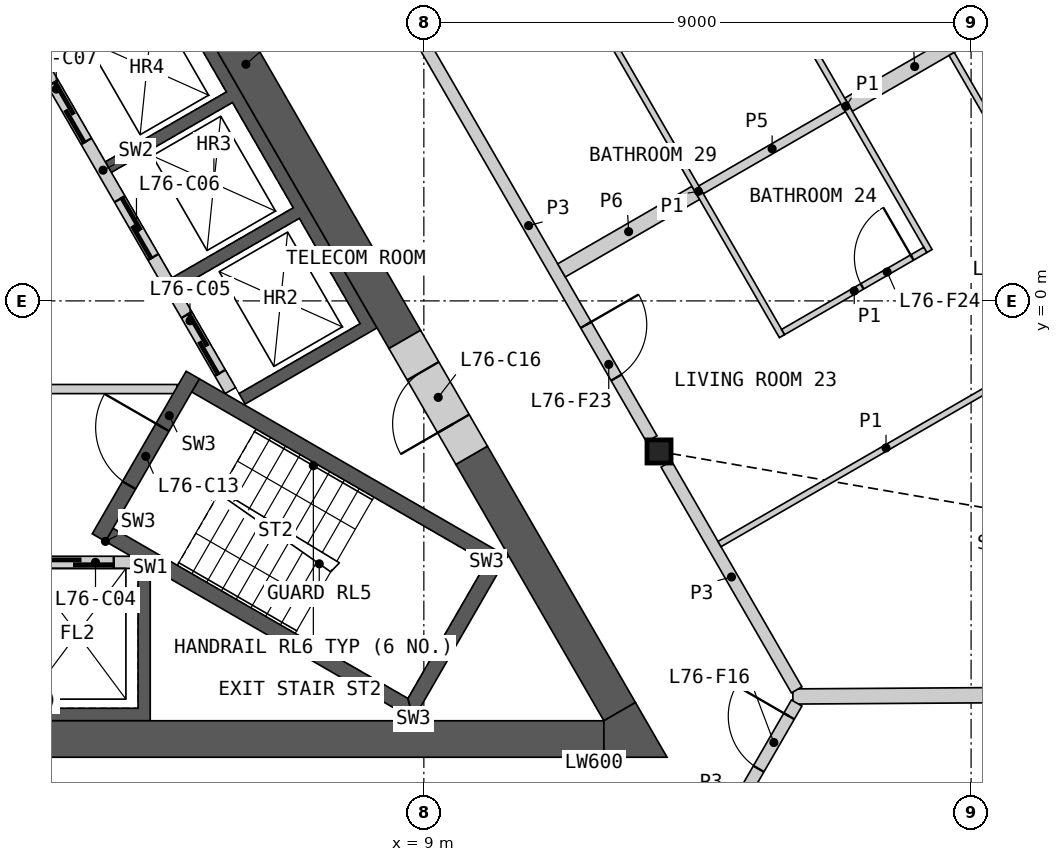
"""IFC4 building model, lengths in metres.
Left out: names, types, materials, properties, quantities, classifications, styles, units other than length and angle.
Written with IfcOpenShell. Run it as: python <this file> out.ifc"""

import sys

from ifc_helpers import new_model, si_unit, direction, frame, frame_2d, origin, origin_2d, place, context, subcontext, project, spatial, polyline, rectangle, i_section, outline, extrude, element, fill, save


model = new_model("IFC4")
c1 = context("Model", 3, precision=1e-05, world=origin(), true_north=direction((0.0, 1.0)))
c2 = subcontext(c1, "Body", "Model", "MODEL_VIEW")
j1 = project(units=[si_unit("LENGTHUNIT", "METRE"), si_unit("PLANEANGLEUNIT", "RADIAN")], contexts=[c1])
p1 = place(None, origin())
s1 = spatial("IfcSite", under=j1, at=p1, CompositionType="ELEMENT")
p2 = place(p1, origin())
s2 = spatial("IfcBuilding", under=s1, at=p2, CompositionType="ELEMENT")
p3 = place(p2, frame((0.0, 0.0, 339.2)))
s3 = spatial("IfcBuildingStorey", under=s2, at=p3, CompositionType="ELEMENT", Elevation=339.2)
p4 = place(p3, frame((12.868, -2.476, 0.0), z_axis=(0.0, 0.0, 1.0), x_axis=(1.0, 0.0, 0.0)))
e1 = element("IfcColumn", 1, at=p4, inside=s3, PredefinedType="COLUMN", context=c2, shape_type="SweptSolid", body=[
    extrude(i_section(OverallWidth=0.396, OverallDepth=0.381, WebThickness=0.019, FlangeThickness=0.03, at=origin_2d()), origin(), (0.0, 0.0, 1.0), 3.4),
])
p5 = place(p3, origin())
e2 = element("IfcWall", 2, at=p5, inside=s3, PredefinedType="SHEAR", context=c2, shape_type="SweptSolid", body=[
    extrude(outline(polyline([(4.5, -4.4), (4.5, -6.906), (-4.5, -6.906), (-4.5, -4.4), (-4.3, -4.4), (-4.3, -6.7), (-2.3, -6.7), (-2.3, -4.4), (-2.1, -4.4), (-2.1, -6.7), (-0.1, -6.7), (-0.1, -4.4), (0.1, -4.4), (0.1, -6.7), (2.1, -6.7), (2.1, -4.4), (2.3, -4.4), (2.3, -6.7), (4.3, -6.7), (4.3, -4.4), (4.5, -4.4)])), origin(), (0.0, 0.0, 1.0), 3.1),
])
p6 = place(p3, frame((-4.187, -4.3, 0.0), z_axis=(0.0, 0.0, 1.0), x_axis=(1.0, 0.0, 0.0)))
e3 = element("IfcWall", 3, at=p6, inside=s3, PredefinedType="SOLIDWALL", context=c2, shape_type="SweptSolid", body=[
    extrude(rectangle(XDim=8.373, YDim=0.2, at=frame_2d((4.187, 0.0))), origin(), (0.0, 0.0, 1.0), 3.1),
])
p7 = place(p6, frame((0.287, 0.0, 0.0)))
e4 = element("IfcOpeningElement", 4, at=p7, cuts=e3, PredefinedType="OPENING", context=c2, shape_type="SweptSolid", body=[
    extrude(rectangle(XDim=1.2, YDim=2.1, at=frame_2d((0.6, 1.05))), frame((0.0, 0.11, 0.0), z_axis=(0.0, -1.0, 0.0), x_axis=(1.0, 0.0, 0.0)), (0.0, 0.0, 1.0), 0.22),
])
p8 = place(p6, frame((2.387, 0.0, 0.0)))
e5 = element("IfcOpeningElement", 5, at=p8, cuts=e3, PredefinedType="OPENING", context=c2, shape_type="SweptSolid", body=[
    extrude(rectangle(XDim=1.4, YDim=2.1, at=frame_2d((0.7, 1.05))), frame((0.0, 0.11, 0.0), z_axis=(0.0, -1.0, 0.0), x_axis=(1.0, 0.0, 0.0)), (0.0, 0.0, 1.0), 0.22),
])
p9 = place(p6, frame((4.737, 0.0, 0.0)))
e6 = element("IfcOpeningElement", 6, at=p9, cuts=e3, PredefinedType="OPENING", context=c2, shape_type="SweptSolid", body=[
    extrude(rectangle(XDim=1.1, YDim=2.1, at=frame_2d((0.55, 1.05))), frame((0.0, 0.11, 0.0), z_axis=(0.0, -1.0, 0.0), x_axis=(1.0, 0.0, 0.0)), (0.0, 0.0, 1.0), 0.22),
])
p10 = place(p6, frame((6.887, 0.0, 0.0)))
e7 = element("IfcOpeningElement", 7, at=p10, cuts=e3, PredefinedType="OPENING", context=c2, shape_type="SweptSolid", body=[
    extrude(rectangle(XDim=1.2, YDim=2.1, at=frame_2d((0.6, 1.05))), frame((0.0, 0.11, 0.0), z_axis=(0.0, -1.0, 0.0), x_axis=(1.0, 0.0, 0.0)), (0.0, 0.0, 1.0), 0.22),
])
p11 = place(p3, origin())
e8 = element("IfcWall", 8, at=p11, inside=s3, PredefinedType="SHEAR", context=c2, shape_type="SweptSolid", body=[
    extrude(outline(polyline([(1.561, 6.097), (3.731, 7.35), (8.231, -0.444), (6.061, -1.697), (5.96, -1.524), (7.952, -0.374), (6.952, 1.358), (4.96, 0.208), (4.861, 0.381), (6.852, 1.531), (5.852, 3.263), (3.861, 2.113), (3.76, 2.287), (5.752, 3.437), (4.752, 5.169), (2.76, 4.019), (2.66, 4.192), (4.652, 5.342), (3.652, 7.074), (1.66, 5.924), (1.561, 6.097)])), origin(), (0.0, 0.0, 1.0), 3.1),
])
p12 = place(p3, frame((5.817, -1.476, 0.0), z_axis=(0.0, 0.0, 1.0), x_axis=(-0.500002616675, 0.866023893041, 0.0)))
e9 = element("IfcWall", 9, at=p12, inside=s3, PredefinedType="SOLIDWALL", context=c2, shape_type="SweptSolid", body=[
    extrude(rectangle(XDim=8.373, YDim=0.2, at=frame_2d((4.187, 0.0))), origin(), (0.0, 0.0, 1.0), 3.1),
])
p13 = place(p12, frame((0.337, 0.0, 0.0)))
e10 = element("IfcOpeningElement", 10, at=p13, cuts=e9, PredefinedType="OPENING", context=c2, shape_type="SweptSolid", body=[
    extrude(rectangle(XDim=1.1, YDim=2.1, at=frame_2d((0.55, 1.05))), frame((0.0, 0.11, 0.0), z_axis=(0.0, -1.0, 0.0), x_axis=(1.0, 0.0, 0.0)), (0.0, 0.0, 1.0), 0.22),
])
p14 = place(p12, frame((2.537, 0.0, 0.0)))
e11 = element("IfcOpeningElement", 11, at=p14, cuts=e9, PredefinedType="OPENING", context=c2, shape_type="SweptSolid", body=[
    extrude(rectangle(XDim=1.1, YDim=2.1, at=frame_2d((0.55, 1.05))), frame((0.0, 0.11, 0.0), z_axis=(0.0, -1.0, 0.0), x_axis=(1.0, 0.0, 0.0)), (0.0, 0.0, 1.0), 0.22),
])
p15 = place(p12, frame((4.737, 0.0, 0.0)))
e12 = element("IfcOpeningElement", 12, at=p15, cuts=e9, PredefinedType="OPENING", context=c2, shape_type="SweptSolid", body=[
    extrude(rectangle(XDim=1.1, YDim=2.1, at=frame_2d((0.55, 1.05))), frame((0.0, 0.11, 0.0), z_axis=(0.0, -1.0, 0.0), x_axis=(1.0, 0.0, 0.0)), (0.0, 0.0, 1.0), 0.22),
])
p16 = place(p12, frame((7.037, 0.0, 0.0)))
e13 = element("IfcOpeningElement", 13, at=p16, cuts=e9, PredefinedType="OPENING", context=c2, shape_type="SweptSolid", body=[
    extrude(rectangle(XDim=0.9, YDim=2.1, at=frame_2d((0.45, 1.05))), frame((0.0, 0.11, 0.0), z_axis=(0.0, -1.0, 0.0), x_axis=(1.0, 0.0, 0.0)), (0.0, 0.0, 1.0), 0.22),
])
p17 = place(p3, frame((-4.941, -1.45, 0.0), z_axis=(0.0, 0.0, 1.0), x_axis=(1.0, 0.0, 0.0)))
e14 = element("IfcWall", 14, at=p17, inside=s3, PredefinedType="PARTITIONING", context=c2, shape_type="SweptSolid", body=[
    extrude(rectangle(XDim=9.882, YDim=0.15, at=frame_2d((4.941, 0.0))), origin(), (0.0, 0.0, 1.0), 3.1),
])
p18 = place(p17, frame((4.391, 0.0, 0.0)))
e15 = element("IfcOpeningElement", 15, at=p18, cuts=e14, PredefinedType="OPENING", context=c2, shape_type="SweptSolid", body=[
    extrude(rectangle(XDim=1.1, YDim=2.1, at=frame_2d((0.55, 1.05))), frame((0.0, 0.085, 0.0), z_axis=(0.0, -1.0, 0.0), x_axis=(1.0, 0.0, 0.0)), (0.0, 0.0, 1.0), 0.17),
])
p19 = place(p3, origin())
e16 = element("IfcWall", 16, at=p19, inside=s3, PredefinedType="SHEAR", context=c2, shape_type="SweptSolid", body=[
    extrude(outline(polyline([(3.763, -3.956), (8.83, -6.881), (8.738, -6.539), (3.888, -3.739), (3.763, -3.956)])), origin(), (0.0, 0.0, 1.0), 3.1),
])
p20 = place(p3, origin())
e17 = element("IfcWall", 17, at=p20, inside=s3, PredefinedType="SHEAR", context=c2, shape_type="SweptSolid", body=[
    extrude(outline(polyline([(8.83, -6.881), (10.374, -4.206), (10.032, -4.298), (8.738, -6.539), (8.83, -6.881)])), origin(), (0.0, 0.0, 1.0), 3.1),
])
p21 = place(p3, origin())
e18 = element("IfcWall", 18, at=p21, inside=s3, PredefinedType="SHEAR", context=c2, shape_type="SweptSolid", body=[
    extrude(outline(polyline([(10.032, -4.298), (10.374, -4.206), (5.307, -1.281), (5.182, -1.498), (10.032, -4.298)])), origin(), (0.0, 0.0, 1.0), 3.1),
])
p22 = place(p3, frame((3.655, -3.893, 0.0), z_axis=(0.0, 0.0, 1.0), x_axis=(0.499982516597, 0.866035497597, 0.0)))
e19 = element("IfcWall", 19, at=p22, inside=s3, PredefinedType="SHEAR", context=c2, shape_type="SweptSolid", body=[
    extrude(rectangle(XDim=3.088, YDim=0.25, at=frame_2d((1.544, 0.0))), origin(), (0.0, 0.0, 1.0), 3.1),
])
p23 = place(p22, frame((0.994, 0.0, 0.0)))
e20 = element("IfcOpeningElement", 20, at=p23, cuts=e19, PredefinedType="OPENING", context=c2, shape_type="SweptSolid", body=[
    extrude(rectangle(XDim=1.1, YDim=2.1, at=frame_2d((0.55, 1.05))), frame((0.0, 0.135, 0.0), z_axis=(0.0, -1.0, 0.0), x_axis=(1.0, 0.0, 0.0)), (0.0, 0.0, 1.0), 0.27),
])
p24 = place(p3, frame((-11.961, -7.206, 0.0), z_axis=(0.0, 0.0, 1.0), x_axis=(1.0, 0.0, 0.0)))
e21 = element("IfcWall", 21, at=p24, inside=s3, PredefinedType="SHEAR", context=c2, shape_type="SweptSolid", body=[
    extrude(rectangle(XDim=23.921, YDim=0.6, at=frame_2d((11.961, 0.0))), origin(), (0.0, 0.0, 1.0), 3.1),
])
p25 = place(p3, frame((8.686, -0.634, 0.0), z_axis=(0.0, 0.0, 1.0), x_axis=(-0.50001836461, 0.866014800712, 0.0)))
e22 = element("IfcWall", 22, at=p25, inside=s3, PredefinedType="SHEAR", context=c2, shape_type="SweptSolid", body=[
    extrude(rectangle(XDim=10.451, YDim=0.6, at=frame_2d((5.225, 0.0))), origin(), (0.0, 0.0, 1.0), 3.1),
])
p26 = place(p3, frame((12.221, -6.756, 0.0), z_axis=(0.0, 0.0, 1.0), x_axis=(-0.50000604952, 0.866021911064, 0.0)))
e23 = element("IfcWall", 23, at=p26, inside=s3, PredefinedType="SHEAR", context=c2, shape_type="SweptSolid", body=[
    extrude(rectangle(XDim=4.869, YDim=0.6, at=frame_2d((2.434, 0.0))), origin(), (0.0, 0.0, 1.0), 3.1),
])
p27 = place(p3, origin())
e24 = element("IfcWall", 24, at=p27, inside=s3, PredefinedType="SHEAR", context=c2, shape_type="SweptSolid", body=[
    extrude(outline(polyline([(11.961, -7.506), (11.961, -6.906), (12.48, -6.606), (13.0, -7.506), (11.961, -7.506)])), origin(), (0.0, 0.0, 1.0), 3.1),
])
p28 = place(p3, frame((9.786, -2.539, 0.0), z_axis=(0.0, 0.0, 1.0), x_axis=(-0.499981787252, 0.866035918664, 0.0)))
e25 = element("IfcWall", 25, at=p28, inside=s3, PredefinedType="SHEAR", context=c2, shape_type="SweptSolid", body=[
    extrude(rectangle(XDim=2.2, YDim=0.6, at=frame_2d((1.1, 0.0))), origin(), (0.0, 0.0, 1.0), 3.1),
])
p29 = place(p28, frame((0.6, 0.0, 0.0)))
e26 = element("IfcOpeningElement", 26, at=p29, cuts=e25, PredefinedType="OPENING", context=c2, shape_type="SweptSolid", body=[
    extrude(rectangle(XDim=1.0, YDim=2.1, at=frame_2d((0.5, 1.05))), frame((0.0, 0.31, 0.0), z_axis=(0.0, -1.0, 0.0), x_axis=(1.0, 0.0, 0.0)), (0.0, 0.0, 1.0), 0.62),
])
p30 = place(p3, frame((8.698, 4.745, 0.0), z_axis=(0.0, 0.0, 1.0), x_axis=(0.499984266882, -0.866034487114, 0.0)))
e27 = element("IfcWall", 27, at=p30, inside=s3, PredefinedType="PARTITIONING", context=c2, shape_type="SweptSolid", body=[
    extrude(rectangle(XDim=8.099, YDim=0.2, at=frame_2d((4.049, 0.0))), origin(), (0.0, 0.0, 1.0), 3.1),
])
p31 = place(p30, frame((5.935, 0.0, 0.0)))
e28 = element("IfcOpeningElement", 28, at=p31, cuts=e27, PredefinedType="OPENING", context=c2, shape_type="SweptSolid", body=[
    extrude(rectangle(XDim=1.0, YDim=2.1, at=frame_2d((0.5, 1.05))), frame((0.0, 0.11, 0.0), z_axis=(0.0, -1.0, 0.0), x_axis=(1.0, 0.0, 0.0)), (0.0, 0.0, 1.0), 0.22),
])
p32 = place(p3, frame((15.069, -6.506, 0.0), z_axis=(0.0, 0.0, 1.0), x_axis=(0.999979186485, 0.006451867641, 0.0)))
e29 = element("IfcWall", 29, at=p32, inside=s3, PredefinedType="PARTITIONING", context=c2, shape_type="SweptSolid", body=[
    extrude(rectangle(XDim=8.098, YDim=0.25, at=frame_2d((4.049, 0.0))), origin(), (0.0, 0.0, 1.0), 2.33),
])
p33 = place(p3, frame((12.988, -2.684, 0.0), z_axis=(0.0, 0.0, 1.0), x_axis=(0.500003406062, -0.866023437285, 0.0)))
e30 = element("IfcWall", 30, at=p33, inside=s3, PredefinedType="PARTITIONING", context=c2, shape_type="SweptSolid", body=[
    extrude(rectangle(XDim=4.288, YDim=0.2, at=frame_2d((2.144, 0.0))), origin(), (0.0, 0.0, 1.0), 3.1),
])
p34 = place(p3, frame((13.293, -9.797, 0.0), z_axis=(0.0, 0.0, 1.0), x_axis=(0.499967746641, 0.866044024469, 0.0)))
e31 = element("IfcWall", 31, at=p34, inside=s3, PredefinedType="PARTITIONING", context=c2, shape_type="SweptSolid", body=[
    extrude(rectangle(XDim=3.676, YDim=0.2, at=frame_2d((1.838, 0.0))), origin(), (0.0, 0.0, 1.0), 3.1),
])
p35 = place(p34, frame((2.426, 0.0, 0.0)))
e32 = element("IfcOpeningElement", 32, at=p35, cuts=e31, PredefinedType="OPENING", context=c2, shape_type="SweptSolid", body=[
    extrude(rectangle(XDim=1.0, YDim=2.1, at=frame_2d((0.5, 1.05))), frame((0.0, 0.11, 0.0), z_axis=(0.0, -1.0, 0.0), x_axis=(1.0, 0.0, 0.0)), (0.0, 0.0, 1.0), 0.22),
])
p36 = place(p3, frame((11.264, 0.502, 0.0), z_axis=(0.0, 0.0, 1.0), x_axis=(0.866030925526, 0.499990435942, 0.0)))
e33 = element("IfcWall", 33, at=p36, inside=s3, PredefinedType="PARTITIONING", context=c2, shape_type="SweptSolid", body=[
    extrude(rectangle(XDim=2.55, YDim=0.25, at=frame_2d((1.275, 0.0))), origin(), (0.0, 0.0, 1.0), 2.33),
])
p37 = place(p3, frame((15.984, 3.227, 0.0), z_axis=(0.0, 0.0, 1.0), x_axis=(0.8660174017, 0.500013859761, 0.0)))
e34 = element("IfcWall", 34, at=p37, inside=s3, PredefinedType="PARTITIONING", context=c2, shape_type="SweptSolid", body=[
    extrude(rectangle(XDim=2.514, YDim=0.25, at=frame_2d((1.257, 0.0))), origin(), (0.0, 0.0, 1.0), 2.33),
])
p38 = place(p3, frame((13.559, 1.827, 0.0), z_axis=(0.0, 0.0, 1.0), x_axis=(0.866059108428, 0.4999416173, 0.0)))
e35 = element("IfcWall", 35, at=p38, inside=s3, PredefinedType="PLUMBINGWALL", context=c2, shape_type="SweptSolid", body=[
    extrude(rectangle(XDim=2.7, YDim=0.15, at=frame_2d((1.35, 0.0))), origin(), (0.0, 0.0, 1.0), 2.33),
])
p39 = place(p3, frame((13.863, -4.0, 0.0), z_axis=(0.0, 0.0, 1.0), x_axis=(0.866033203648, 0.499986489997, 0.0)))
e36 = element("IfcWall", 36, at=p39, inside=s3, PredefinedType="PARTITIONING", context=c2, shape_type="SweptSolid", body=[
    extrude(rectangle(XDim=12.646, YDim=0.1, at=frame_2d((6.323, 0.0))), origin(), (0.0, 0.0, 1.0), 2.33),
])
p40 = place(p39, frame((8.319, 0.0, 0.0)))
e37 = element("IfcOpeningElement", 37, at=p40, cuts=e36, PredefinedType="OPENING", context=c2, shape_type="SweptSolid", body=[
    extrude(rectangle(XDim=0.95, YDim=2.1, at=frame_2d((0.475, 1.05))), frame((0.0, 0.06, 0.0), z_axis=(0.0, -1.0, 0.0), x_axis=(1.0, 0.0, 0.0)), (0.0, 0.0, 1.0), 0.12),
])
p41 = place(p3, frame((14.565, 5.583, 0.0), z_axis=(0.0, 0.0, 1.0), x_axis=(0.499996545922, -0.866027397988, 0.0)))
e38 = element("IfcWall", 38, at=p41, inside=s3, PredefinedType="PARTITIONING", context=c2, shape_type="SweptSolid", body=[
    extrude(rectangle(XDim=5.5, YDim=0.1, at=frame_2d((2.75, 0.0))), origin(), (0.0, 0.0, 1.0), 2.33),
])
p42 = place(p41, frame((0.25, 0.0, 0.0)))
e39 = element("IfcOpeningElement", 39, at=p42, cuts=e38, PredefinedType="OPENING", context=c2, shape_type="SweptSolid", body=[
    extrude(rectangle(XDim=0.95, YDim=2.1, at=frame_2d((0.475, 1.05))), frame((0.0, 0.06, 0.0), z_axis=(0.0, -1.0, 0.0), x_axis=(1.0, 0.0, 0.0)), (0.0, 0.0, 1.0), 0.12),
])
p43 = place(p3, frame((12.14, 4.183, 0.0), z_axis=(0.0, 0.0, 1.0), x_axis=(0.499996545922, -0.866027397988, 0.0)))
e40 = element("IfcWall", 40, at=p43, inside=s3, PredefinedType="PARTITIONING", context=c2, shape_type="SweptSolid", body=[
    extrude(rectangle(XDim=5.5, YDim=0.1, at=frame_2d((2.75, 0.0))), origin(), (0.0, 0.0, 1.0), 2.33),
])
p44 = place(p3, frame((17.68, 4.062, 0.0), z_axis=(0.0, 0.0, 1.0), x_axis=(0.499997360652, -0.866026927608, 0.0)))
e41 = element("IfcWall", 41, at=p44, inside=s3, PredefinedType="PARTITIONING", context=c2, shape_type="SweptSolid", body=[
    extrude(rectangle(XDim=5.022, YDim=0.1, at=frame_2d((2.511, 0.0))), origin(), (0.0, 0.0, 1.0), 2.33),
])
p45 = place(p44, frame((3.108, 0.0, 0.0)))
e42 = element("IfcOpeningElement", 42, at=p45, cuts=e41, PredefinedType="OPENING", context=c2, shape_type="SweptSolid", body=[
    extrude(rectangle(XDim=0.95, YDim=2.1, at=frame_2d((0.475, 1.05))), frame((0.0, 0.06, 0.0), z_axis=(0.0, -1.0, 0.0), x_axis=(1.0, 0.0, 0.0)), (0.0, 0.0, 1.0), 0.12),
])
p46 = place(p3, frame((14.909, -0.512, 0.0), z_axis=(0.0, 0.0, 1.0), x_axis=(0.866019956843, 0.50000943426, 0.0)))
e43 = element("IfcWall", 43, at=p46, inside=s3, PredefinedType="PARTITIONING", context=c2, shape_type="SweptSolid", body=[
    extrude(rectangle(XDim=2.7, YDim=0.1, at=frame_2d((1.35, 0.0))), origin(), (0.0, 0.0, 1.0), 2.33),
])
p47 = place(p46, frame((1.5, 0.0, 0.0)))
e44 = element("IfcOpeningElement", 44, at=p47, cuts=e43, PredefinedType="OPENING", context=c2, shape_type="SweptSolid", body=[
    extrude(rectangle(XDim=0.95, YDim=2.1, at=frame_2d((0.475, 1.05))), frame((0.0, 0.06, 0.0), z_axis=(0.0, -1.0, 0.0), x_axis=(1.0, 0.0, 0.0)), (0.0, 0.0, 1.0), 0.12),
])
p48 = place(p10, origin())
e45 = element("IfcDoor", 45, at=p48, inside=s3, OperationType="SLIDING_TO_LEFT", PredefinedType="DOOR", context=c2, shape_type="SweptSolid", body=[
    extrude(rectangle(XDim=1.2, YDim=2.1, at=frame_2d((0.6, 1.05))), frame((0.0, 0.025, 0.0), z_axis=(0.0, -1.0, 0.0), x_axis=(1.0, 0.0, 0.0)), (0.0, 0.0, 1.0), 0.05),
])
fill(e7, e45)
p49 = place(p13, origin())
e46 = element("IfcDoor", 46, at=p49, inside=s3, OperationType="SLIDING_TO_LEFT", PredefinedType="DOOR", context=c2, shape_type="SweptSolid", body=[
    extrude(rectangle(XDim=1.1, YDim=2.1, at=frame_2d((0.55, 1.05))), frame((0.0, 0.025, 0.0), z_axis=(0.0, -1.0, 0.0), x_axis=(1.0, 0.0, 0.0)), (0.0, 0.0, 1.0), 0.05),
])
fill(e10, e46)
p50 = place(p14, origin())
e47 = element("IfcDoor", 47, at=p50, inside=s3, OperationType="SLIDING_TO_LEFT", PredefinedType="DOOR", context=c2, shape_type="SweptSolid", body=[
    extrude(rectangle(XDim=1.1, YDim=2.1, at=frame_2d((0.55, 1.05))), frame((0.0, 0.025, 0.0), z_axis=(0.0, -1.0, 0.0), x_axis=(1.0, 0.0, 0.0)), (0.0, 0.0, 1.0), 0.05),
])
fill(e11, e47)
p51 = place(p15, origin())
e48 = element("IfcDoor", 48, at=p51, inside=s3, OperationType="SLIDING_TO_LEFT", PredefinedType="DOOR", context=c2, shape_type="SweptSolid", body=[
    extrude(rectangle(XDim=1.1, YDim=2.1, at=frame_2d((0.55, 1.05))), frame((0.0, 0.025, 0.0), z_axis=(0.0, -1.0, 0.0), x_axis=(1.0, 0.0, 0.0)), (0.0, 0.0, 1.0), 0.05),
])
fill(e12, e48)
p52 = place(p23, origin())
e49 = element("IfcDoor", 49, at=p52, inside=s3, OperationType="SINGLE_SWING_RIGHT", PredefinedType="DOOR", context=c2, shape_type="SweptSolid", body=[
    extrude(rectangle(XDim=1.1, YDim=2.1, at=frame_2d((0.55, 1.05))), frame((0.0, 0.025, 0.0), z_axis=(0.0, -1.0, 0.0), x_axis=(1.0, 0.0, 0.0)), (0.0, 0.0, 1.0), 0.05),
])
fill(e20, e49)
p53 = place(p29, origin())
e50 = element("IfcDoor", 50, at=p53, inside=s3, OperationType="SINGLE_SWING_LEFT", PredefinedType="DOOR", context=c2, shape_type="SweptSolid", body=[
    extrude(rectangle(XDim=1.0, YDim=2.1, at=frame_2d((0.5, 1.05))), frame((0.0, 0.055, 0.0), z_axis=(0.0, -1.0, 0.0), x_axis=(1.0, 0.0, 0.0)), (0.0, 0.0, 1.0), 0.05),
])
fill(e26, e50)
p54 = place(p35, origin())
e51 = element("IfcDoor", 51, at=p54, inside=s3, OperationType="SINGLE_SWING_RIGHT", PredefinedType="DOOR", context=c2, shape_type="SweptSolid", body=[
    extrude(rectangle(XDim=1.0, YDim=2.1, at=frame_2d((0.5, 1.05))), frame((0.0, 0.025, 0.0), z_axis=(0.0, -1.0, 0.0), x_axis=(1.0, 0.0, 0.0)), (0.0, 0.0, 1.0), 0.05),
])
fill(e32, e51)
p55 = place(p31, origin())
e52 = element("IfcDoor", 52, at=p55, inside=s3, OperationType="SINGLE_SWING_LEFT", PredefinedType="DOOR", context=c2, shape_type="SweptSolid", body=[
    extrude(rectangle(XDim=1.0, YDim=2.1, at=frame_2d((0.5, 1.05))), frame((0.0, 0.025, 0.0), z_axis=(0.0, -1.0, 0.0), x_axis=(1.0, 0.0, 0.0)), (0.0, 0.0, 1.0), 0.05),
])
fill(e28, e52)
p56 = place(p47, origin())
e53 = element("IfcDoor", 53, at=p56, inside=s3, OperationType="SINGLE_SWING_RIGHT", PredefinedType="DOOR", context=c2, shape_type="SweptSolid", body=[
    extrude(rectangle(XDim=0.95, YDim=2.1, at=frame_2d((0.475, 1.05))), frame((0.0, 0.025, 0.0), z_axis=(0.0, -1.0, 0.0), x_axis=(1.0, 0.0, 0.0)), (0.0, 0.0, 1.0), 0.05),
])
fill(e44, e53)
save(model, sys.argv[1])
